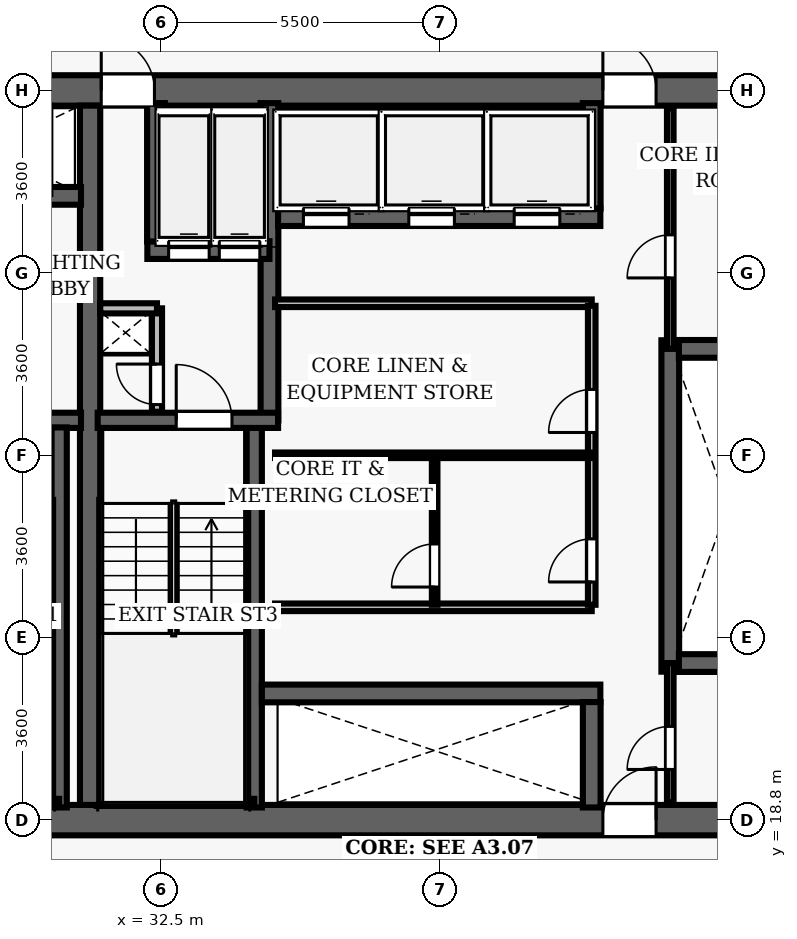
"""IFC4 building model, lengths in metres.
Left out: names, types, materials, properties, quantities, classifications, styles, units other than length and angle.
Written with IfcOpenShell. Run it as: python <this file> out.ifc"""

import sys

from ifc_helpers import new_model, si_unit, direction, frame, frame_2d, origin, place, context, subcontext, project, spatial, rectangle, extrude, element, fill, save


model = new_model("IFC4")
c1 = context("Model", 3, precision=1e-05, world=origin(), true_north=direction((0.0, 1.0)))
c2 = subcontext(c1, "Body", "Model", "MODEL_VIEW")
j1 = project(units=[si_unit("LENGTHUNIT", "METRE"), si_unit("PLANEANGLEUNIT", "RADIAN")], contexts=[c1])
p1 = place(None, origin())
s1 = spatial("IfcSite", under=j1, at=p1, CompositionType="ELEMENT")
p2 = place(p1, origin())
s2 = spatial("IfcBuilding", under=s1, at=p2, CompositionType="ELEMENT")
p3 = place(p2, frame((0.0, 0.0, 83.4)))
s3 = spatial("IfcBuildingStorey", under=s2, at=p3, CompositionType="ELEMENT", Elevation=83.4)
p4 = place(p3, frame((26.7, 18.8, 0.0), z_axis=(0.0, 0.0, 1.0), x_axis=(1.0, 0.0, 0.0)))
e1 = element("IfcWall", 1, at=p4, inside=s3, PredefinedType="SHEAR", context=c2, shape_type="SweptSolid", body=[
    extrude(rectangle(XDim=22.6, YDim=0.6, at=frame_2d((11.3, 0.0))), origin(), (0.0, 0.0, 1.0), 3.5),
])
p5 = place(p4, frame((14.52, 0.0, 0.0)))
e2 = element("IfcOpeningElement", 2, at=p5, cuts=e1, PredefinedType="OPENING", context=c2, shape_type="SweptSolid", body=[
    extrude(rectangle(XDim=1.05, YDim=2.15, at=frame_2d((0.525, 1.075))), frame((0.0, 0.31, 0.0), z_axis=(0.0, -1.0, 0.0), x_axis=(1.0, 0.0, 0.0)), (0.0, 0.0, 1.0), 0.62),
])
p6 = place(p3, frame((26.7, 33.2, 0.0), z_axis=(0.0, 0.0, 1.0), x_axis=(1.0, 0.0, 0.0)))
e3 = element("IfcWall", 3, at=p6, inside=s3, PredefinedType="SHEAR", context=c2, shape_type="SweptSolid", body=[
    extrude(rectangle(XDim=22.6, YDim=0.6, at=frame_2d((11.3, 0.0))), origin(), (0.0, 0.0, 1.0), 3.5),
])
p7 = place(p6, frame((4.62, 0.0, 0.0)))
e4 = element("IfcOpeningElement", 4, at=p7, cuts=e3, PredefinedType="OPENING", context=c2, shape_type="SweptSolid", body=[
    extrude(rectangle(XDim=1.05, YDim=2.15, at=frame_2d((0.525, 1.075))), frame((0.0, 0.31, 0.0), z_axis=(0.0, -1.0, 0.0), x_axis=(1.0, 0.0, 0.0)), (0.0, 0.0, 1.0), 0.62),
])
p8 = place(p6, frame((14.52, 0.0, 0.0)))
e5 = element("IfcOpeningElement", 5, at=p8, cuts=e3, PredefinedType="OPENING", context=c2, shape_type="SweptSolid", body=[
    extrude(rectangle(XDim=1.05, YDim=2.15, at=frame_2d((0.525, 1.075))), frame((0.0, 0.31, 0.0), z_axis=(0.0, -1.0, 0.0), x_axis=(1.0, 0.0, 0.0)), (0.0, 0.0, 1.0), 0.62),
])
p9 = place(p3, frame((31.1, 19.1, 0.0), z_axis=(0.0, 0.0, 1.0), x_axis=(0.0, 1.0, 0.0)))
e6 = element("IfcWall", 6, at=p9, inside=s3, PredefinedType="SHEAR", context=c2, shape_type="SweptSolid", body=[
    extrude(rectangle(XDim=13.8, YDim=0.4, at=frame_2d((6.9, 0.0))), origin(), (0.0, 0.0, 1.0), 3.5),
])
p10 = place(p3, frame((27.25, 26.69, 0.0), z_axis=(0.0, 0.0, 1.0), x_axis=(1.0, 0.0, 0.0)))
e7 = element("IfcWall", 7, at=p10, inside=s3, PredefinedType="SHEAR", context=c2, shape_type="SweptSolid", body=[
    extrude(rectangle(XDim=3.67, YDim=0.3, at=frame_2d((1.835, 0.0))), origin(), (0.0, 0.0, 1.0), 3.5),
])
p11 = place(p10, frame((1.05, 0.0, 0.0)))
e8 = element("IfcOpeningElement", 8, at=p11, cuts=e7, PredefinedType="OPENING", context=c2, shape_type="SweptSolid", body=[
    extrude(rectangle(XDim=1.1, YDim=2.15, at=frame_2d((0.55, 1.075))), frame((0.0, 0.16, 0.0), z_axis=(0.0, -1.0, 0.0), x_axis=(1.0, 0.0, 0.0)), (0.0, 0.0, 1.0), 0.32),
])
p12 = place(p3, frame((30.49, 19.05, 0.0), z_axis=(0.0, 0.0, 1.0), x_axis=(0.0, 1.0, 0.0)))
e9 = element("IfcWall", 9, at=p12, inside=s3, PredefinedType="SHEAR", context=c2, shape_type="SweptSolid", body=[
    extrude(rectangle(XDim=7.5, YDim=0.3, at=frame_2d((3.75, 0.0))), origin(), (0.0, 0.0, 1.0), 3.5),
])
p13 = place(p3, frame((27.395, 19.16, 0.0), z_axis=(0.0, 0.0, 1.0), x_axis=(1.0, 0.0, 0.0)))
e10 = element("IfcWall", 10, at=p13, inside=s3, PredefinedType="SHEAR", context=c2, shape_type="SweptSolid", body=[
    extrude(rectangle(XDim=3.095, YDim=0.12, at=frame_2d((1.547, 0.0))), origin(), (0.0, 0.0, 1.0), 3.5),
])
p14 = place(p3, frame((27.25, 31.12, 0.0), z_axis=(0.0, 0.0, 1.0), x_axis=(1.0, 0.0, 0.0)))
e11 = element("IfcWall", 11, at=p14, inside=s3, PredefinedType="SHEAR", context=c2, shape_type="SweptSolid", body=[
    extrude(rectangle(XDim=3.67, YDim=0.35, at=frame_2d((1.835, 0.0))), origin(), (0.0, 0.0, 1.0), 2.6),
])
p15 = place(p14, frame((1.25, 0.0, 0.0)))
e12 = element("IfcOpeningElement", 12, at=p15, cuts=e11, PredefinedType="OPENING", context=c2, shape_type="SweptSolid", body=[
    extrude(rectangle(XDim=1.1, YDim=2.15, at=frame_2d((0.55, 1.075))), frame((0.0, 0.185, 0.0), z_axis=(0.0, -1.0, 0.0), x_axis=(1.0, 0.0, 0.0)), (0.0, 0.0, 1.0), 0.37),
])
p16 = place(p3, frame((34.34, 19.05, 0.0), z_axis=(0.0, 0.0, 1.0), x_axis=(0.0, 1.0, 0.0)))
e13 = element("IfcWall", 13, at=p16, inside=s3, PredefinedType="SHEAR", context=c2, shape_type="SweptSolid", body=[
    extrude(rectangle(XDim=7.5, YDim=0.3, at=frame_2d((3.75, 0.0))), origin(), (0.0, 0.0, 1.0), 3.5),
])
p17 = place(p3, frame((34.64, 26.69, 0.0), z_axis=(0.0, 0.0, 1.0), x_axis=(0.0, 1.0, 0.0)))
e14 = element("IfcWall", 14, at=p17, inside=s3, PredefinedType="SHEAR", context=c2, shape_type="SweptSolid", body=[
    extrude(rectangle(XDim=6.26, YDim=0.35, at=frame_2d((3.13, 0.0))), origin(), (0.0, 0.0, 1.0), 3.5),
])
p18 = place(p3, frame((31.25, 26.69, 0.0), z_axis=(0.0, 0.0, 1.0), x_axis=(1.0, 0.0, 0.0)))
e15 = element("IfcWall", 15, at=p18, inside=s3, PredefinedType="SHEAR", context=c2, shape_type="SweptSolid", body=[
    extrude(rectangle(XDim=3.56, YDim=0.3, at=frame_2d((1.78, 0.0))), origin(), (0.0, 0.0, 1.0), 3.5),
])
p19 = place(p18, frame((1.55, 0.0, 0.0)))
e16 = element("IfcOpeningElement", 16, at=p19, cuts=e15, PredefinedType="OPENING", context=c2, shape_type="SweptSolid", body=[
    extrude(rectangle(XDim=1.1, YDim=2.15, at=frame_2d((0.55, 1.075))), frame((0.0, 0.16, 0.0), z_axis=(0.0, -1.0, 0.0), x_axis=(1.0, 0.0, 0.0)), (0.0, 0.0, 1.0), 0.32),
])
p20 = place(p3, frame((31.3, 19.16, 0.0), z_axis=(0.0, 0.0, 1.0), x_axis=(1.0, 0.0, 0.0)))
e17 = element("IfcWall", 17, at=p20, inside=s3, PredefinedType="SHEAR", context=c2, shape_type="SweptSolid", body=[
    extrude(rectangle(XDim=3.04, YDim=0.12, at=frame_2d((1.52, 0.0))), origin(), (0.0, 0.0, 1.0), 3.5),
])
p21 = place(p3, frame((32.23, 30.05, 0.0), z_axis=(0.0, 0.0, 1.0), x_axis=(1.0, 0.0, 0.0)))
e18 = element("IfcWall", 18, at=p21, inside=s3, PredefinedType="SHEAR", context=c2, shape_type="SweptSolid", body=[
    extrude(rectangle(XDim=2.41, YDim=0.35, at=frame_2d((1.205, 0.0))), origin(), (0.0, 0.0, 1.0), 2.6),
])
p22 = place(p21, frame((0.42, 0.0, 0.0)))
e19 = element("IfcOpeningElement", 19, at=p22, cuts=e18, PredefinedType="OPENING", context=c2, shape_type="SweptSolid", body=[
    extrude(rectangle(XDim=0.8, YDim=2.15, at=frame_2d((0.4, 1.075))), frame((0.0, 0.185, 0.0), z_axis=(0.0, -1.0, 0.0), x_axis=(1.0, 0.0, 0.0)), (0.0, 0.0, 1.0), 0.37),
])
p23 = place(p21, frame((1.42, 0.0, 0.0)))
e20 = element("IfcOpeningElement", 20, at=p23, cuts=e18, PredefinedType="OPENING", context=c2, shape_type="SweptSolid", body=[
    extrude(rectangle(XDim=0.8, YDim=2.15, at=frame_2d((0.4, 1.075))), frame((0.0, 0.185, 0.0), z_axis=(0.0, -1.0, 0.0), x_axis=(1.0, 0.0, 0.0)), (0.0, 0.0, 1.0), 0.37),
])
p24 = place(p3, frame((32.4, 30.22, 0.0), z_axis=(0.0, 0.0, 1.0), x_axis=(0.0, 1.0, 0.0)))
e21 = element("IfcWall", 21, at=p24, inside=s3, PredefinedType="SHEAR", context=c2, shape_type="SweptSolid", body=[
    extrude(rectangle(XDim=2.73, YDim=0.35, at=frame_2d((1.365, 0.0))), origin(), (0.0, 0.0, 1.0), 2.6),
])
p25 = place(p3, frame((32.42, 26.86, 0.0), z_axis=(0.0, 0.0, 1.0), x_axis=(0.0, 1.0, 0.0)))
e22 = element("IfcWall", 22, at=p25, inside=s3, PredefinedType="PARTITIONING", context=c2, shape_type="SweptSolid", body=[
    extrude(rectangle(XDim=2.04, YDim=0.2, at=frame_2d((1.02, 0.0))), origin(), (0.0, 0.0, 1.0), 2.6),
])
p26 = place(p25, frame((0.14, 0.0, 0.0)))
e23 = element("IfcOpeningElement", 23, at=p26, cuts=e22, PredefinedType="OPENING", context=c2, shape_type="SweptSolid", body=[
    extrude(rectangle(XDim=0.8, YDim=2.05, at=frame_2d((0.4, 1.025))), frame((0.0, 0.11, 0.0), z_axis=(0.0, -1.0, 0.0), x_axis=(1.0, 0.0, 0.0)), (0.0, 0.0, 1.0), 0.22),
])
p27 = place(p3, frame((31.3, 28.9, 0.0), z_axis=(0.0, 0.0, 1.0), x_axis=(1.0, 0.0, 0.0)))
e24 = element("IfcWall", 24, at=p27, inside=s3, PredefinedType="PARTITIONING", context=c2, shape_type="SweptSolid", body=[
    extrude(rectangle(XDim=1.12, YDim=0.2, at=frame_2d((0.56, 0.0))), origin(), (0.0, 0.0, 1.0), 2.6),
])
p28 = place(p3, frame((42.55, 21.73, 0.0), z_axis=(0.0, 0.0, 1.0), x_axis=(0.0, 1.0, 0.0)))
e25 = element("IfcWall", 25, at=p28, inside=s3, PredefinedType="SHEAR", context=c2, shape_type="SweptSolid", body=[
    extrude(rectangle(XDim=6.54, YDim=0.35, at=frame_2d((3.27, 0.0))), origin(), (0.0, 0.0, 1.0), 2.6),
])
for number, where, z_axis, x_axis in (
    (26, (42.72, 21.9, 0.0), (0.0, 0.0, 1.0), (1.0, 0.0, 0.0)),
    (27, (42.72, 28.1, 0.0), (0.0, 0.0, 1.0), (1.0, 0.0, 0.0)),
):
    element("IfcWall", number, at=place(p3, frame(where, z_axis=z_axis, x_axis=x_axis)), inside=s3, PredefinedType="SHEAR", context=c2, shape_type="SweptSolid", body=[
        extrude(rectangle(XDim=2.03, YDim=0.35, at=frame_2d((1.015, 0.0))), origin(), (0.0, 0.0, 1.0), 2.6),
    ])
p29 = place(p3, frame((34.81, 30.7, 0.0), z_axis=(0.0, 0.0, 1.0), x_axis=(1.0, 0.0, 0.0)))
e28 = element("IfcWall", 28, at=p29, inside=s3, PredefinedType="SHEAR", context=c2, shape_type="SweptSolid", body=[
    extrude(rectangle(XDim=6.36, YDim=0.35, at=frame_2d((3.18, 0.0))), origin(), (0.0, 0.0, 1.0), 2.6),
])
p30 = place(p29, frame((0.5, 0.0, 0.0)))
e29 = element("IfcOpeningElement", 29, at=p30, cuts=e28, PredefinedType="OPENING", context=c2, shape_type="SweptSolid", body=[
    extrude(rectangle(XDim=0.9, YDim=2.15, at=frame_2d((0.45, 1.075))), frame((0.0, 0.185, 0.0), z_axis=(0.0, -1.0, 0.0), x_axis=(1.0, 0.0, 0.0)), (0.0, 0.0, 1.0), 0.37),
])
p31 = place(p29, frame((2.58, 0.0, 0.0)))
e30 = element("IfcOpeningElement", 30, at=p31, cuts=e28, PredefinedType="OPENING", context=c2, shape_type="SweptSolid", body=[
    extrude(rectangle(XDim=0.9, YDim=2.15, at=frame_2d((0.45, 1.075))), frame((0.0, 0.185, 0.0), z_axis=(0.0, -1.0, 0.0), x_axis=(1.0, 0.0, 0.0)), (0.0, 0.0, 1.0), 0.37),
])
p32 = place(p29, frame((4.66, 0.0, 0.0)))
e31 = element("IfcOpeningElement", 31, at=p32, cuts=e28, PredefinedType="OPENING", context=c2, shape_type="SweptSolid", body=[
    extrude(rectangle(XDim=0.9, YDim=2.15, at=frame_2d((0.45, 1.075))), frame((0.0, 0.185, 0.0), z_axis=(0.0, -1.0, 0.0), x_axis=(1.0, 0.0, 0.0)), (0.0, 0.0, 1.0), 0.37),
])
p33 = place(p3, frame((41.0, 30.87, 0.0), z_axis=(0.0, 0.0, 1.0), x_axis=(0.0, 1.0, 0.0)))
e32 = element("IfcWall", 32, at=p33, inside=s3, PredefinedType="SHEAR", context=c2, shape_type="SweptSolid", body=[
    extrude(rectangle(XDim=2.08, YDim=0.35, at=frame_2d((1.04, 0.0))), origin(), (0.0, 0.0, 1.0), 2.6),
])
p34 = place(p3, frame((34.49, 21.3, 0.0), z_axis=(0.0, 0.0, 1.0), x_axis=(1.0, 0.0, 0.0)))
e33 = element("IfcWall", 33, at=p34, inside=s3, PredefinedType="SHEAR", context=c2, shape_type="SweptSolid", body=[
    extrude(rectangle(XDim=6.68, YDim=0.35, at=frame_2d((3.34, 0.0))), origin(), (0.0, 0.0, 1.0), 2.6),
])
p35 = place(p3, frame((41.0, 19.05, 0.0), z_axis=(0.0, 0.0, 1.0), x_axis=(0.0, 1.0, 0.0)))
e34 = element("IfcWall", 34, at=p35, inside=s3, PredefinedType="SHEAR", context=c2, shape_type="SweptSolid", body=[
    extrude(rectangle(XDim=2.08, YDim=0.35, at=frame_2d((1.04, 0.0))), origin(), (0.0, 0.0, 1.0), 2.6),
])
for number, where, z_axis, x_axis in (
    (35, (34.75, 29.0, 0.0), (0.0, 0.0, 1.0), (1.0, 0.0, 0.0)),
    (36, (34.75, 23.0, 0.0), (0.0, 0.0, 1.0), (1.0, 0.0, 0.0)),
):
    element("IfcWall", number, at=place(p3, frame(where, z_axis=z_axis, x_axis=x_axis)), inside=s3, PredefinedType="PARTITIONING", context=c2, shape_type="SweptSolid", body=[
        extrude(rectangle(XDim=6.25, YDim=0.15, at=frame_2d((3.125, 0.0))), origin(), (0.0, 0.0, 1.0), 2.6),
    ])
p36 = place(p3, frame((41.0, 23.05, 0.0), z_axis=(0.0, 0.0, 1.0), x_axis=(0.0, 1.0, 0.0)))
e37 = element("IfcWall", 37, at=p36, inside=s3, PredefinedType="PARTITIONING", context=c2, shape_type="SweptSolid", body=[
    extrude(rectangle(XDim=5.9, YDim=0.15, at=frame_2d((2.95, 0.0))), origin(), (0.0, 0.0, 1.0), 2.6),
])
p37 = place(p36, frame((3.4, 0.0, 0.0)))
e38 = element("IfcOpeningElement", 38, at=p37, cuts=e37, PredefinedType="OPENING", context=c2, shape_type="SweptSolid", body=[
    extrude(rectangle(XDim=0.85, YDim=2.1, at=frame_2d((0.425, 1.05))), frame((0.0, 0.085, 0.0), z_axis=(0.0, -1.0, 0.0), x_axis=(1.0, 0.0, 0.0)), (0.0, 0.0, 1.0), 0.17),
])
p38 = place(p36, frame((0.45, 0.0, 0.0)))
e39 = element("IfcOpeningElement", 39, at=p38, cuts=e37, PredefinedType="OPENING", context=c2, shape_type="SweptSolid", body=[
    extrude(rectangle(XDim=0.85, YDim=2.1, at=frame_2d((0.425, 1.05))), frame((0.0, 0.085, 0.0), z_axis=(0.0, -1.0, 0.0), x_axis=(1.0, 0.0, 0.0)), (0.0, 0.0, 1.0), 0.17),
])
p39 = place(p3, frame((34.75, 26.0, 0.0), z_axis=(0.0, 0.0, 1.0), x_axis=(1.0, 0.0, 0.0)))
e40 = element("IfcWall", 40, at=p39, inside=s3, PredefinedType="PARTITIONING", context=c2, shape_type="SweptSolid", body=[
    extrude(rectangle(XDim=6.25, YDim=0.11, at=frame_2d((3.125, 0.0))), origin(), (0.0, 0.0, 1.0), 2.6),
])
p40 = place(p3, frame((37.9, 23.05, 0.0), z_axis=(0.0, 0.0, 1.0), x_axis=(0.0, 1.0, 0.0)))
e41 = element("IfcWall", 41, at=p40, inside=s3, PredefinedType="PARTITIONING", context=c2, shape_type="SweptSolid", body=[
    extrude(rectangle(XDim=2.95, YDim=0.11, at=frame_2d((1.475, 0.0))), origin(), (0.0, 0.0, 1.0), 2.6),
])
p41 = place(p40, frame((0.35, 0.0, 0.0)))
e42 = element("IfcOpeningElement", 42, at=p41, cuts=e41, PredefinedType="OPENING", context=c2, shape_type="SweptSolid", body=[
    extrude(rectangle(XDim=0.85, YDim=2.1, at=frame_2d((0.425, 1.05))), frame((0.0, 0.065, 0.0), z_axis=(0.0, -1.0, 0.0), x_axis=(1.0, 0.0, 0.0)), (0.0, 0.0, 1.0), 0.13),
])
p42 = place(p3, frame((42.55, 28.1, 0.0), z_axis=(0.0, 0.0, 1.0), x_axis=(0.0, 1.0, 0.0)))
e43 = element("IfcWall", 43, at=p42, inside=s3, PredefinedType="PARTITIONING", context=c2, shape_type="SweptSolid", body=[
    extrude(rectangle(XDim=4.75, YDim=0.13, at=frame_2d((2.375, 0.0))), origin(), (0.0, 0.0, 1.0), 2.6),
])
p43 = place(p42, frame((1.4, 0.0, 0.0)))
e44 = element("IfcOpeningElement", 44, at=p43, cuts=e43, PredefinedType="OPENING", context=c2, shape_type="SweptSolid", body=[
    extrude(rectangle(XDim=0.85, YDim=2.1, at=frame_2d((0.425, 1.05))), frame((0.0, 0.075, 0.0), z_axis=(0.0, -1.0, 0.0), x_axis=(1.0, 0.0, 0.0)), (0.0, 0.0, 1.0), 0.15),
])
p44 = place(p3, frame((42.55, 19.15, 0.0), z_axis=(0.0, 0.0, 1.0), x_axis=(0.0, 1.0, 0.0)))
e45 = element("IfcWall", 45, at=p44, inside=s3, PredefinedType="PARTITIONING", context=c2, shape_type="SweptSolid", body=[
    extrude(rectangle(XDim=2.75, YDim=0.13, at=frame_2d((1.375, 0.0))), origin(), (0.0, 0.0, 1.0), 2.6),
])
p45 = place(p44, frame((0.65, 0.0, 0.0)))
e46 = element("IfcOpeningElement", 46, at=p45, cuts=e45, PredefinedType="OPENING", context=c2, shape_type="SweptSolid", body=[
    extrude(rectangle(XDim=0.85, YDim=2.1, at=frame_2d((0.425, 1.05))), frame((0.0, 0.075, 0.0), z_axis=(0.0, -1.0, 0.0), x_axis=(1.0, 0.0, 0.0)), (0.0, 0.0, 1.0), 0.15),
])
p46 = place(p19, origin())
e47 = element("IfcDoor", 47, at=p46, inside=s3, OperationType="SINGLE_SWING_LEFT", PredefinedType="DOOR", context=c2, shape_type="SweptSolid", body=[
    extrude(rectangle(XDim=1.1, YDim=2.15, at=frame_2d((0.55, 1.075))), frame((0.0, 0.025, 0.0), z_axis=(0.0, -1.0, 0.0), x_axis=(1.0, 0.0, 0.0)), (0.0, 0.0, 1.0), 0.05),
])
fill(e16, e47)
p47 = place(p26, origin())
e48 = element("IfcDoor", 48, at=p47, inside=s3, OperationType="SINGLE_SWING_RIGHT", PredefinedType="DOOR", context=c2, shape_type="SweptSolid", body=[
    extrude(rectangle(XDim=0.8, YDim=2.05, at=frame_2d((0.4, 1.025))), frame((0.0, 0.025, 0.0), z_axis=(0.0, -1.0, 0.0), x_axis=(1.0, 0.0, 0.0)), (0.0, 0.0, 1.0), 0.05),
])
fill(e23, e48)
p48 = place(p7, origin())
e49 = element("IfcDoor", 49, at=p48, inside=s3, OperationType="SINGLE_SWING_LEFT", PredefinedType="DOOR", context=c2, shape_type="SweptSolid", body=[
    extrude(rectangle(XDim=1.05, YDim=2.15, at=frame_2d((0.525, 1.075))), frame((0.0, 0.025, 0.0), z_axis=(0.0, -1.0, 0.0), x_axis=(1.0, 0.0, 0.0)), (0.0, 0.0, 1.0), 0.05),
])
fill(e4, e49)
p49 = place(p8, origin())
e50 = element("IfcDoor", 50, at=p49, inside=s3, OperationType="SINGLE_SWING_LEFT", PredefinedType="DOOR", context=c2, shape_type="SweptSolid", body=[
    extrude(rectangle(XDim=1.05, YDim=2.15, at=frame_2d((0.525, 1.075))), frame((0.0, 0.025, 0.0), z_axis=(0.0, -1.0, 0.0), x_axis=(1.0, 0.0, 0.0)), (0.0, 0.0, 1.0), 0.05),
])
fill(e5, e50)
p50 = place(p5, origin())
e51 = element("IfcDoor", 51, at=p50, inside=s3, OperationType="SINGLE_SWING_RIGHT", PredefinedType="DOOR", context=c2, shape_type="SweptSolid", body=[
    extrude(rectangle(XDim=1.05, YDim=2.15, at=frame_2d((0.525, 1.075))), frame((0.0, 0.025, 0.0), z_axis=(0.0, -1.0, 0.0), x_axis=(1.0, 0.0, 0.0)), (0.0, 0.0, 1.0), 0.05),
])
fill(e2, e51)
p51 = place(p37, origin())
e52 = element("IfcDoor", 52, at=p51, inside=s3, OperationType="SINGLE_SWING_LEFT", PredefinedType="DOOR", context=c2, shape_type="SweptSolid", body=[
    extrude(rectangle(XDim=0.85, YDim=2.1, at=frame_2d((0.425, 1.05))), frame((0.0, 0.025, 0.0), z_axis=(0.0, -1.0, 0.0), x_axis=(1.0, 0.0, 0.0)), (0.0, 0.0, 1.0), 0.05),
])
fill(e38, e52)
p52 = place(p38, origin())
e53 = element("IfcDoor", 53, at=p52, inside=s3, OperationType="SINGLE_SWING_LEFT", PredefinedType="DOOR", context=c2, shape_type="SweptSolid", body=[
    extrude(rectangle(XDim=0.85, YDim=2.1, at=frame_2d((0.425, 1.05))), frame((0.0, 0.025, 0.0), z_axis=(0.0, -1.0, 0.0), x_axis=(1.0, 0.0, 0.0)), (0.0, 0.0, 1.0), 0.05),
])
fill(e39, e53)
p53 = place(p41, origin())
e54 = element("IfcDoor", 54, at=p53, inside=s3, OperationType="SINGLE_SWING_LEFT", PredefinedType="DOOR", context=c2, shape_type="SweptSolid", body=[
    extrude(rectangle(XDim=0.85, YDim=2.1, at=frame_2d((0.425, 1.05))), frame((0.0, 0.025, 0.0), z_axis=(0.0, -1.0, 0.0), x_axis=(1.0, 0.0, 0.0)), (0.0, 0.0, 1.0), 0.05),
])
fill(e42, e54)
p54 = place(p43, origin())
e55 = element("IfcDoor", 55, at=p54, inside=s3, OperationType="SINGLE_SWING_LEFT", PredefinedType="DOOR", context=c2, shape_type="SweptSolid", body=[
    extrude(rectangle(XDim=0.85, YDim=2.1, at=frame_2d((0.425, 1.05))), frame((0.0, 0.025, 0.0), z_axis=(0.0, -1.0, 0.0), x_axis=(1.0, 0.0, 0.0)), (0.0, 0.0, 1.0), 0.05),
])
fill(e44, e55)
p55 = place(p45, origin())
e56 = element("IfcDoor", 56, at=p55, inside=s3, OperationType="SINGLE_SWING_LEFT", PredefinedType="DOOR", context=c2, shape_type="SweptSolid", body=[
    extrude(rectangle(XDim=0.85, YDim=2.1, at=frame_2d((0.425, 1.05))), frame((0.0, 0.025, 0.0), z_axis=(0.0, -1.0, 0.0), x_axis=(1.0, 0.0, 0.0)), (0.0, 0.0, 1.0), 0.05),
])
fill(e46, e56)
p56 = place(p30, origin())
e57 = element("IfcDoor", 57, at=p56, inside=s3, OperationType="SLIDING_TO_LEFT", PredefinedType="DOOR", context=c2, shape_type="SweptSolid", body=[
    extrude(rectangle(XDim=0.9, YDim=2.15, at=frame_2d((0.45, 1.075))), frame((0.0, 0.025, 0.0), z_axis=(0.0, -1.0, 0.0), x_axis=(1.0, 0.0, 0.0)), (0.0, 0.0, 1.0), 0.05),
])
fill(e29, e57)
p57 = place(p31, origin())
e58 = element("IfcDoor", 58, at=p57, inside=s3, OperationType="SLIDING_TO_LEFT", PredefinedType="DOOR", context=c2, shape_type="SweptSolid", body=[
    extrude(rectangle(XDim=0.9, YDim=2.15, at=frame_2d((0.45, 1.075))), frame((0.0, 0.025, 0.0), z_axis=(0.0, -1.0, 0.0), x_axis=(1.0, 0.0, 0.0)), (0.0, 0.0, 1.0), 0.05),
])
fill(e30, e58)
p58 = place(p32, origin())
e59 = element("IfcDoor", 59, at=p58, inside=s3, OperationType="SLIDING_TO_LEFT", PredefinedType="DOOR", context=c2, shape_type="SweptSolid", body=[
    extrude(rectangle(XDim=0.9, YDim=2.15, at=frame_2d((0.45, 1.075))), frame((0.0, 0.025, 0.0), z_axis=(0.0, -1.0, 0.0), x_axis=(1.0, 0.0, 0.0)), (0.0, 0.0, 1.0), 0.05),
])
fill(e31, e59)
p59 = place(p22, origin())
e60 = element("IfcDoor", 60, at=p59, inside=s3, OperationType="SLIDING_TO_LEFT", PredefinedType="DOOR", context=c2, shape_type="SweptSolid", body=[
    extrude(rectangle(XDim=0.8, YDim=2.15, at=frame_2d((0.4, 1.075))), frame((0.0, 0.025, 0.0), z_axis=(0.0, -1.0, 0.0), x_axis=(1.0, 0.0, 0.0)), (0.0, 0.0, 1.0), 0.05),
])
fill(e19, e60)
p60 = place(p23, origin())
e61 = element("IfcDoor", 61, at=p60, inside=s3, OperationType="SLIDING_TO_LEFT", PredefinedType="DOOR", context=c2, shape_type="SweptSolid", body=[
    extrude(rectangle(XDim=0.8, YDim=2.15, at=frame_2d((0.4, 1.075))), frame((0.0, 0.025, 0.0), z_axis=(0.0, -1.0, 0.0), x_axis=(1.0, 0.0, 0.0)), (0.0, 0.0, 1.0), 0.05),
])
fill(e20, e61)
save(model, sys.argv[1])
